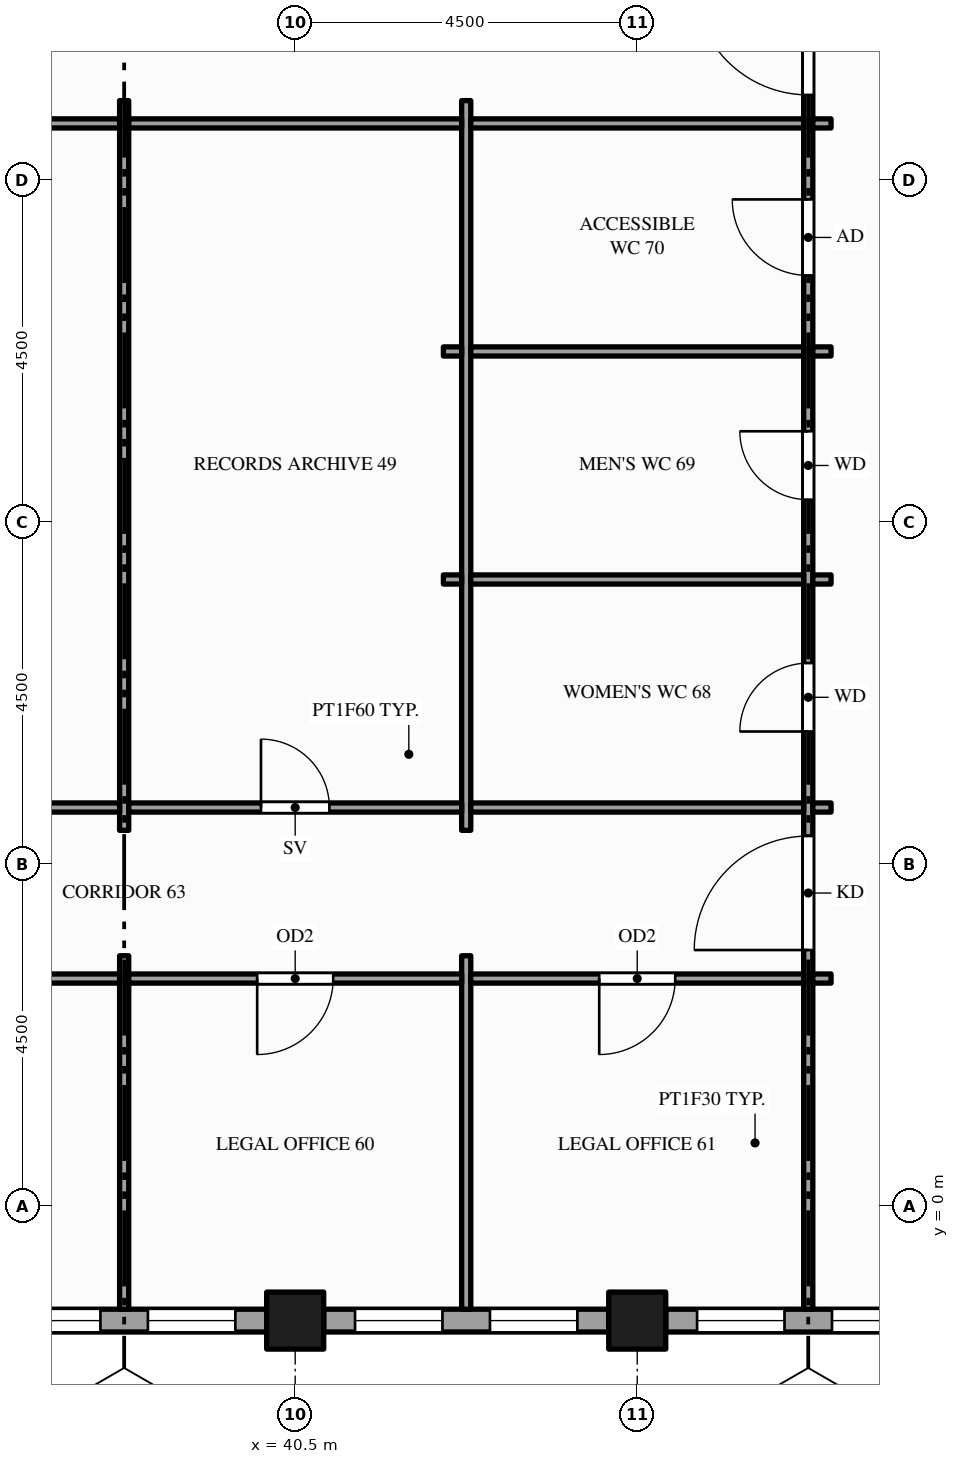
"""IFC4 building model, lengths in metres.
Left out: names, types, materials, properties, quantities, classifications, styles, units other than length and angle.
Written with IfcOpenShell. Run it as: python <this file> out.ifc"""

import sys

from ifc_helpers import new_model, si_unit, direction, frame, frame_2d, origin, origin_2d, place, context, subcontext, project, spatial, rectangle, hollow_rectangle, extrude, element, fill, save


model = new_model("IFC4")
c1 = context("Model", 3, precision=1e-05, world=origin(), true_north=direction((0.0, 1.0)))
c2 = subcontext(c1, "Body", "Model", "MODEL_VIEW")
j1 = project(units=[si_unit("LENGTHUNIT", "METRE"), si_unit("PLANEANGLEUNIT", "RADIAN")], contexts=[c1])
p1 = place(None, origin())
s1 = spatial("IfcSite", under=j1, at=p1, CompositionType="ELEMENT")
p2 = place(p1, origin())
s2 = spatial("IfcBuilding", under=s1, at=p2, CompositionType="ELEMENT")
p3 = place(p2, frame((0.0, 0.0, 227.0)))
s3 = spatial("IfcBuildingStorey", under=s2, at=p3, CompositionType="ELEMENT", Elevation=227.0)
for number, where, z_axis, x_axis in (
    (1, (40.5, -1.5, -0.15), (0.0, 0.0, 1.0), (1.0, 0.0, 0.0)),
    (2, (45.0, -1.5, -0.15), (0.0, 0.0, 1.0), (1.0, 0.0, 0.0)),
):
    element("IfcColumn", number, at=place(p3, frame(where, z_axis=z_axis, x_axis=x_axis)), inside=s3, PredefinedType="COLUMN", context=c2, shape_type="SweptSolid", body=[
        extrude(hollow_rectangle(XDim=0.75, YDim=0.75, WallThickness=0.036, at=origin_2d()), origin(), (0.0, 0.0, 1.0), 4.0),
    ])
p4 = place(p3, frame((36.375, -1.5, 0.0), z_axis=(0.0, 0.0, 1.0), x_axis=(1.0, 0.0, 0.0)))
e3 = element("IfcWall", 3, at=p4, inside=s3, PredefinedType="STANDARD", context=c2, shape_type="SweptSolid", body=[
    extrude(rectangle(XDim=3.75, YDim=0.3, at=frame_2d((1.875, 0.0))), origin(), (0.0, 0.0, 1.0), 2.87),
])
p5 = place(p4, frame((0.413, 0.0, 0.9)))
e4 = element("IfcOpeningElement", 4, at=p5, cuts=e3, PredefinedType="OPENING", context=c2, shape_type="SweptSolid", body=[
    extrude(rectangle(XDim=1.15, YDim=1.75, at=frame_2d((0.575, 0.875))), frame((0.0, 0.16, 0.0), z_axis=(0.0, -1.0, 0.0), x_axis=(1.0, 0.0, 0.0)), (0.0, 0.0, 1.0), 0.32),
])
p6 = place(p4, frame((2.188, 0.0, 0.9)))
e5 = element("IfcOpeningElement", 5, at=p6, cuts=e3, PredefinedType="OPENING", context=c2, shape_type="SweptSolid", body=[
    extrude(rectangle(XDim=1.15, YDim=1.75, at=frame_2d((0.575, 0.875))), frame((0.0, 0.16, 0.0), z_axis=(0.0, -1.0, 0.0), x_axis=(1.0, 0.0, 0.0)), (0.0, 0.0, 1.0), 0.32),
])
p7 = place(p3, frame((40.875, -1.5, 0.0), z_axis=(0.0, 0.0, 1.0), x_axis=(1.0, 0.0, 0.0)))
e6 = element("IfcWall", 6, at=p7, inside=s3, PredefinedType="STANDARD", context=c2, shape_type="SweptSolid", body=[
    extrude(rectangle(XDim=3.75, YDim=0.3, at=frame_2d((1.875, 0.0))), origin(), (0.0, 0.0, 1.0), 2.87),
])
p8 = place(p7, frame((0.413, 0.0, 0.9)))
e7 = element("IfcOpeningElement", 7, at=p8, cuts=e6, PredefinedType="OPENING", context=c2, shape_type="SweptSolid", body=[
    extrude(rectangle(XDim=1.15, YDim=1.75, at=frame_2d((0.575, 0.875))), frame((0.0, 0.16, 0.0), z_axis=(0.0, -1.0, 0.0), x_axis=(1.0, 0.0, 0.0)), (0.0, 0.0, 1.0), 0.32),
])
p9 = place(p7, frame((2.188, 0.0, 0.9)))
e8 = element("IfcOpeningElement", 8, at=p9, cuts=e6, PredefinedType="OPENING", context=c2, shape_type="SweptSolid", body=[
    extrude(rectangle(XDim=1.15, YDim=1.75, at=frame_2d((0.575, 0.875))), frame((0.0, 0.16, 0.0), z_axis=(0.0, -1.0, 0.0), x_axis=(1.0, 0.0, 0.0)), (0.0, 0.0, 1.0), 0.32),
])
p10 = place(p3, frame((45.375, -1.5, 0.0), z_axis=(0.0, 0.0, 1.0), x_axis=(1.0, 0.0, 0.0)))
e9 = element("IfcWall", 9, at=p10, inside=s3, PredefinedType="STANDARD", context=c2, shape_type="SweptSolid", body=[
    extrude(rectangle(XDim=3.75, YDim=0.3, at=frame_2d((1.875, 0.0))), origin(), (0.0, 0.0, 1.0), 2.87),
])
p11 = place(p10, frame((0.413, 0.0, 0.9)))
e10 = element("IfcOpeningElement", 10, at=p11, cuts=e9, PredefinedType="OPENING", context=c2, shape_type="SweptSolid", body=[
    extrude(rectangle(XDim=1.15, YDim=1.75, at=frame_2d((0.575, 0.875))), frame((0.0, 0.16, 0.0), z_axis=(0.0, -1.0, 0.0), x_axis=(1.0, 0.0, 0.0)), (0.0, 0.0, 1.0), 0.32),
])
p12 = place(p10, frame((2.188, 0.0, 0.9)))
e11 = element("IfcOpeningElement", 11, at=p12, cuts=e9, PredefinedType="OPENING", context=c2, shape_type="SweptSolid", body=[
    extrude(rectangle(XDim=1.15, YDim=1.75, at=frame_2d((0.575, 0.875))), frame((0.0, 0.16, 0.0), z_axis=(0.0, -1.0, 0.0), x_axis=(1.0, 0.0, 0.0)), (0.0, 0.0, 1.0), 0.32),
])
p13 = place(p3, frame((38.25, -1.35, 0.0), z_axis=(0.0, 0.0, 1.0), x_axis=(0.0, 1.0, 0.0)))
e12 = element("IfcWall", 12, at=p13, inside=s3, PredefinedType="PARTITIONING", context=c2, shape_type="SweptSolid", body=[
    extrude(rectangle(XDim=4.65, YDim=0.12, at=frame_2d((2.325, 0.0))), origin(), (0.0, 0.0, 1.0), 2.87),
])
p14 = place(p3, frame((38.25, 4.95, 0.0), z_axis=(0.0, 0.0, 1.0), x_axis=(0.0, 1.0, 0.0)))
e13 = element("IfcWall", 13, at=p14, inside=s3, PredefinedType="PARTITIONING", context=c2, shape_type="SweptSolid", body=[
    extrude(rectangle(XDim=9.6, YDim=0.12, at=frame_2d((4.8, 0.0))), origin(), (0.0, 0.0, 1.0), 2.87),
])
p15 = place(p3, frame((42.75, -1.35, 0.0), z_axis=(0.0, 0.0, 1.0), x_axis=(0.0, 1.0, 0.0)))
e14 = element("IfcWall", 14, at=p15, inside=s3, PredefinedType="PARTITIONING", context=c2, shape_type="SweptSolid", body=[
    extrude(rectangle(XDim=4.65, YDim=0.12, at=frame_2d((2.325, 0.0))), origin(), (0.0, 0.0, 1.0), 2.87),
])
p16 = place(p3, frame((42.75, 4.95, 0.0), z_axis=(0.0, 0.0, 1.0), x_axis=(0.0, 1.0, 0.0)))
e15 = element("IfcWall", 15, at=p16, inside=s3, PredefinedType="PARTITIONING", context=c2, shape_type="SweptSolid", body=[
    extrude(rectangle(XDim=9.6, YDim=0.12, at=frame_2d((4.8, 0.0))), origin(), (0.0, 0.0, 1.0), 2.87),
])
p17 = place(p3, frame((47.25, -1.35, 0.0), z_axis=(0.0, 0.0, 1.0), x_axis=(0.0, 1.0, 0.0)))
e16 = element("IfcWall", 16, at=p17, inside=s3, PredefinedType="PARTITIONING", context=c2, shape_type="SweptSolid", body=[
    extrude(rectangle(XDim=22.2, YDim=0.12, at=frame_2d((11.1, 0.0))), origin(), (0.0, 0.0, 1.0), 2.87),
])
p18 = place(p17, frame((4.725, 0.0, 0.0)))
e17 = element("IfcOpeningElement", 17, at=p18, cuts=e16, PredefinedType="OPENING", context=c2, shape_type="SweptSolid", body=[
    extrude(rectangle(XDim=1.5, YDim=2.1, at=frame_2d((0.75, 1.05))), frame((0.0, 0.07, 0.0), z_axis=(0.0, -1.0, 0.0), x_axis=(1.0, 0.0, 0.0)), (0.0, 0.0, 1.0), 0.14),
])
p19 = place(p17, frame((15.975, 0.0, 0.0)))
e18 = element("IfcOpeningElement", 18, at=p19, cuts=e16, PredefinedType="OPENING", context=c2, shape_type="SweptSolid", body=[
    extrude(rectangle(XDim=1.5, YDim=2.1, at=frame_2d((0.75, 1.05))), frame((0.0, 0.07, 0.0), z_axis=(0.0, -1.0, 0.0), x_axis=(1.0, 0.0, 0.0)), (0.0, 0.0, 1.0), 0.14),
])
p20 = place(p17, frame((7.6, 0.0, 0.0)))
e19 = element("IfcOpeningElement", 19, at=p20, cuts=e16, PredefinedType="OPENING", context=c2, shape_type="SweptSolid", body=[
    extrude(rectangle(XDim=0.9, YDim=2.1, at=frame_2d((0.45, 1.05))), frame((0.0, 0.07, 0.0), z_axis=(0.0, -1.0, 0.0), x_axis=(1.0, 0.0, 0.0)), (0.0, 0.0, 1.0), 0.14),
])
p21 = place(p17, frame((10.65, 0.0, 0.0)))
e20 = element("IfcOpeningElement", 20, at=p21, cuts=e16, PredefinedType="OPENING", context=c2, shape_type="SweptSolid", body=[
    extrude(rectangle(XDim=0.9, YDim=2.1, at=frame_2d((0.45, 1.05))), frame((0.0, 0.07, 0.0), z_axis=(0.0, -1.0, 0.0), x_axis=(1.0, 0.0, 0.0)), (0.0, 0.0, 1.0), 0.14),
])
p22 = place(p17, frame((13.6, 0.0, 0.0)))
e21 = element("IfcOpeningElement", 21, at=p22, cuts=e16, PredefinedType="OPENING", context=c2, shape_type="SweptSolid", body=[
    extrude(rectangle(XDim=1.0, YDim=2.1, at=frame_2d((0.5, 1.05))), frame((0.0, 0.07, 0.0), z_axis=(0.0, -1.0, 0.0), x_axis=(1.0, 0.0, 0.0)), (0.0, 0.0, 1.0), 0.14),
])
p23 = place(p3, frame((29.31, 3.0, 0.0), z_axis=(0.0, 0.0, 1.0), x_axis=(1.0, 0.0, 0.0)))
e22 = element("IfcWall", 22, at=p23, inside=s3, PredefinedType="PARTITIONING", context=c2, shape_type="SweptSolid", body=[
    extrude(rectangle(XDim=8.88, YDim=0.12, at=frame_2d((4.44, 0.0))), origin(), (0.0, 0.0, 1.0), 2.87),
])
p24 = place(p23, frame((3.54, 0.0, 0.0)))
e23 = element("IfcOpeningElement", 23, at=p24, cuts=e22, PredefinedType="OPENING", context=c2, shape_type="SweptSolid", body=[
    extrude(rectangle(XDim=1.8, YDim=2.1, at=frame_2d((0.9, 1.05))), frame((0.0, 0.07, 0.0), z_axis=(0.0, -1.0, 0.0), x_axis=(1.0, 0.0, 0.0)), (0.0, 0.0, 1.0), 0.14),
])
p25 = place(p3, frame((38.31, 3.0, 0.0), z_axis=(0.0, 0.0, 1.0), x_axis=(1.0, 0.0, 0.0)))
e24 = element("IfcWall", 24, at=p25, inside=s3, PredefinedType="PARTITIONING", context=c2, shape_type="SweptSolid", body=[
    extrude(rectangle(XDim=4.38, YDim=0.12, at=frame_2d((2.19, 0.0))), origin(), (0.0, 0.0, 1.0), 2.87),
])
p26 = place(p25, frame((1.69, 0.0, 0.0)))
e25 = element("IfcOpeningElement", 25, at=p26, cuts=e24, PredefinedType="OPENING", context=c2, shape_type="SweptSolid", body=[
    extrude(rectangle(XDim=1.0, YDim=2.1, at=frame_2d((0.5, 1.05))), frame((0.0, 0.07, 0.0), z_axis=(0.0, -1.0, 0.0), x_axis=(1.0, 0.0, 0.0)), (0.0, 0.0, 1.0), 0.14),
])
p27 = place(p3, frame((42.81, 3.0, 0.0), z_axis=(0.0, 0.0, 1.0), x_axis=(1.0, 0.0, 0.0)))
e26 = element("IfcWall", 26, at=p27, inside=s3, PredefinedType="PARTITIONING", context=c2, shape_type="SweptSolid", body=[
    extrude(rectangle(XDim=4.38, YDim=0.12, at=frame_2d((2.19, 0.0))), origin(), (0.0, 0.0, 1.0), 2.87),
])
p28 = place(p27, frame((1.69, 0.0, 0.0)))
e27 = element("IfcOpeningElement", 27, at=p28, cuts=e26, PredefinedType="OPENING", context=c2, shape_type="SweptSolid", body=[
    extrude(rectangle(XDim=1.0, YDim=2.1, at=frame_2d((0.5, 1.05))), frame((0.0, 0.07, 0.0), z_axis=(0.0, -1.0, 0.0), x_axis=(1.0, 0.0, 0.0)), (0.0, 0.0, 1.0), 0.14),
])
p29 = place(p3, frame((47.31, 3.0, 0.0), z_axis=(0.0, 0.0, 1.0), x_axis=(1.0, 0.0, 0.0)))
e28 = element("IfcWall", 28, at=p29, inside=s3, PredefinedType="PARTITIONING", context=c2, shape_type="SweptSolid", body=[
    extrude(rectangle(XDim=0.24, YDim=0.12, at=frame_2d((0.12, 0.0))), origin(), (0.0, 0.0, 1.0), 2.87),
])
p30 = place(p3, frame((33.81, 5.25, 0.0), z_axis=(0.0, 0.0, 1.0), x_axis=(1.0, 0.0, 0.0)))
e29 = element("IfcWall", 29, at=p30, inside=s3, PredefinedType="PARTITIONING", context=c2, shape_type="SweptSolid", body=[
    extrude(rectangle(XDim=4.38, YDim=0.12, at=frame_2d((2.19, 0.0))), origin(), (0.0, 0.0, 1.0), 2.87),
])
p31 = place(p3, frame((38.31, 5.25, 0.0), z_axis=(0.0, 0.0, 1.0), x_axis=(1.0, 0.0, 0.0)))
e30 = element("IfcWall", 30, at=p31, inside=s3, PredefinedType="PARTITIONING", context=c2, shape_type="SweptSolid", body=[
    extrude(rectangle(XDim=4.38, YDim=0.12, at=frame_2d((2.19, 0.0))), origin(), (0.0, 0.0, 1.0), 2.87),
])
p32 = place(p31, frame((1.74, 0.0, 0.0)))
e31 = element("IfcOpeningElement", 31, at=p32, cuts=e30, PredefinedType="OPENING", context=c2, shape_type="SweptSolid", body=[
    extrude(rectangle(XDim=0.9, YDim=2.1, at=frame_2d((0.45, 1.05))), frame((0.0, 0.07, 0.0), z_axis=(0.0, -1.0, 0.0), x_axis=(1.0, 0.0, 0.0)), (0.0, 0.0, 1.0), 0.14),
])
p33 = place(p3, frame((42.81, 5.25, 0.0), z_axis=(0.0, 0.0, 1.0), x_axis=(1.0, 0.0, 0.0)))
e32 = element("IfcWall", 32, at=p33, inside=s3, PredefinedType="PARTITIONING", context=c2, shape_type="SweptSolid", body=[
    extrude(rectangle(XDim=4.38, YDim=0.12, at=frame_2d((2.19, 0.0))), origin(), (0.0, 0.0, 1.0), 2.87),
])
for number, where, z_axis, x_axis in (
    (33, (47.31, 5.25, 0.0), (0.0, 0.0, 1.0), (1.0, 0.0, 0.0)),
    (34, (42.45, 8.25, 0.0), (0.0, 0.0, 1.0), (1.0, 0.0, 0.0)),
):
    element("IfcWall", number, at=place(p3, frame(where, z_axis=z_axis, x_axis=x_axis)), inside=s3, PredefinedType="PARTITIONING", context=c2, shape_type="SweptSolid", body=[
        extrude(rectangle(XDim=0.24, YDim=0.12, at=frame_2d((0.12, 0.0))), origin(), (0.0, 0.0, 1.0), 2.87),
    ])
p34 = place(p3, frame((42.81, 8.25, 0.0), z_axis=(0.0, 0.0, 1.0), x_axis=(1.0, 0.0, 0.0)))
e35 = element("IfcWall", 35, at=p34, inside=s3, PredefinedType="PARTITIONING", context=c2, shape_type="SweptSolid", body=[
    extrude(rectangle(XDim=4.38, YDim=0.12, at=frame_2d((2.19, 0.0))), origin(), (0.0, 0.0, 1.0), 2.87),
])
for number, where, z_axis, x_axis in (
    (36, (47.31, 8.25, 0.0), (0.0, 0.0, 1.0), (1.0, 0.0, 0.0)),
    (37, (42.45, 11.25, 0.0), (0.0, 0.0, 1.0), (1.0, 0.0, 0.0)),
):
    element("IfcWall", number, at=place(p3, frame(where, z_axis=z_axis, x_axis=x_axis)), inside=s3, PredefinedType="PARTITIONING", context=c2, shape_type="SweptSolid", body=[
        extrude(rectangle(XDim=0.24, YDim=0.12, at=frame_2d((0.12, 0.0))), origin(), (0.0, 0.0, 1.0), 2.87),
    ])
p35 = place(p3, frame((42.81, 11.25, 0.0), z_axis=(0.0, 0.0, 1.0), x_axis=(1.0, 0.0, 0.0)))
e38 = element("IfcWall", 38, at=p35, inside=s3, PredefinedType="PARTITIONING", context=c2, shape_type="SweptSolid", body=[
    extrude(rectangle(XDim=4.38, YDim=0.12, at=frame_2d((2.19, 0.0))), origin(), (0.0, 0.0, 1.0), 2.87),
])
p36 = place(p3, frame((47.31, 11.25, 0.0), z_axis=(0.0, 0.0, 1.0), x_axis=(1.0, 0.0, 0.0)))
e39 = element("IfcWall", 39, at=p36, inside=s3, PredefinedType="PARTITIONING", context=c2, shape_type="SweptSolid", body=[
    extrude(rectangle(XDim=0.24, YDim=0.12, at=frame_2d((0.12, 0.0))), origin(), (0.0, 0.0, 1.0), 2.87),
])
p37 = place(p3, frame((33.81, 14.25, 0.0), z_axis=(0.0, 0.0, 1.0), x_axis=(1.0, 0.0, 0.0)))
e40 = element("IfcWall", 40, at=p37, inside=s3, PredefinedType="PARTITIONING", context=c2, shape_type="SweptSolid", body=[
    extrude(rectangle(XDim=4.38, YDim=0.12, at=frame_2d((2.19, 0.0))), origin(), (0.0, 0.0, 1.0), 2.87),
])
p38 = place(p37, frame((1.59, 0.0, 0.0)))
e41 = element("IfcOpeningElement", 41, at=p38, cuts=e40, PredefinedType="OPENING", context=c2, shape_type="SweptSolid", body=[
    extrude(rectangle(XDim=1.2, YDim=2.1, at=frame_2d((0.6, 1.05))), frame((0.0, 0.07, 0.0), z_axis=(0.0, -1.0, 0.0), x_axis=(1.0, 0.0, 0.0)), (0.0, 0.0, 1.0), 0.14),
])
for number, where, z_axis, x_axis in (
    (42, (38.31, 14.25, 0.0), (0.0, 0.0, 1.0), (1.0, 0.0, 0.0)),
    (43, (42.81, 14.25, 0.0), (0.0, 0.0, 1.0), (1.0, 0.0, 0.0)),
):
    element("IfcWall", number, at=place(p3, frame(where, z_axis=z_axis, x_axis=x_axis)), inside=s3, PredefinedType="PARTITIONING", context=c2, shape_type="SweptSolid", body=[
        extrude(rectangle(XDim=4.38, YDim=0.12, at=frame_2d((2.19, 0.0))), origin(), (0.0, 0.0, 1.0), 2.87),
    ])
p39 = place(p3, frame((47.31, 14.25, 0.0), z_axis=(0.0, 0.0, 1.0), x_axis=(1.0, 0.0, 0.0)))
e44 = element("IfcWall", 44, at=p39, inside=s3, PredefinedType="PARTITIONING", context=c2, shape_type="SweptSolid", body=[
    extrude(rectangle(XDim=0.24, YDim=0.12, at=frame_2d((0.12, 0.0))), origin(), (0.0, 0.0, 1.0), 2.87),
])
p40 = place(p5, origin())
e45 = element("IfcWindow", 45, at=p40, inside=s3, PartitioningType="SINGLE_PANEL", PredefinedType="WINDOW", context=c2, shape_type="SweptSolid", body=[
    extrude(rectangle(XDim=1.15, YDim=1.75, at=frame_2d((0.575, 0.875))), frame((0.0, 0.03, 0.0), z_axis=(0.0, -1.0, 0.0), x_axis=(1.0, 0.0, 0.0)), (0.0, 0.0, 1.0), 0.06),
])
fill(e4, e45)
p41 = place(p6, origin())
e46 = element("IfcWindow", 46, at=p41, inside=s3, PartitioningType="SINGLE_PANEL", PredefinedType="WINDOW", context=c2, shape_type="SweptSolid", body=[
    extrude(rectangle(XDim=1.15, YDim=1.75, at=frame_2d((0.575, 0.875))), frame((0.0, 0.03, 0.0), z_axis=(0.0, -1.0, 0.0), x_axis=(1.0, 0.0, 0.0)), (0.0, 0.0, 1.0), 0.06),
])
fill(e5, e46)
p42 = place(p8, origin())
e47 = element("IfcWindow", 47, at=p42, inside=s3, PartitioningType="SINGLE_PANEL", PredefinedType="WINDOW", context=c2, shape_type="SweptSolid", body=[
    extrude(rectangle(XDim=1.15, YDim=1.75, at=frame_2d((0.575, 0.875))), frame((0.0, 0.03, 0.0), z_axis=(0.0, -1.0, 0.0), x_axis=(1.0, 0.0, 0.0)), (0.0, 0.0, 1.0), 0.06),
])
fill(e7, e47)
p43 = place(p9, origin())
e48 = element("IfcWindow", 48, at=p43, inside=s3, PartitioningType="SINGLE_PANEL", PredefinedType="WINDOW", context=c2, shape_type="SweptSolid", body=[
    extrude(rectangle(XDim=1.15, YDim=1.75, at=frame_2d((0.575, 0.875))), frame((0.0, 0.03, 0.0), z_axis=(0.0, -1.0, 0.0), x_axis=(1.0, 0.0, 0.0)), (0.0, 0.0, 1.0), 0.06),
])
fill(e8, e48)
p44 = place(p11, origin())
e49 = element("IfcWindow", 49, at=p44, inside=s3, PartitioningType="SINGLE_PANEL", PredefinedType="WINDOW", context=c2, shape_type="SweptSolid", body=[
    extrude(rectangle(XDim=1.15, YDim=1.75, at=frame_2d((0.575, 0.875))), frame((0.0, 0.03, 0.0), z_axis=(0.0, -1.0, 0.0), x_axis=(1.0, 0.0, 0.0)), (0.0, 0.0, 1.0), 0.06),
])
fill(e10, e49)
p45 = place(p12, origin())
e50 = element("IfcWindow", 50, at=p45, inside=s3, PartitioningType="SINGLE_PANEL", PredefinedType="WINDOW", context=c2, shape_type="SweptSolid", body=[
    extrude(rectangle(XDim=1.15, YDim=1.75, at=frame_2d((0.575, 0.875))), frame((0.0, 0.03, 0.0), z_axis=(0.0, -1.0, 0.0), x_axis=(1.0, 0.0, 0.0)), (0.0, 0.0, 1.0), 0.06),
])
fill(e11, e50)
p46 = place(p18, origin())
e51 = element("IfcDoor", 51, at=p46, inside=s3, OperationType="SINGLE_SWING_LEFT", PredefinedType="DOOR", context=c2, shape_type="SweptSolid", body=[
    extrude(rectangle(XDim=1.5, YDim=2.1, at=frame_2d((0.75, 1.05))), frame((0.0, 0.025, 0.0), z_axis=(0.0, -1.0, 0.0), x_axis=(1.0, 0.0, 0.0)), (0.0, 0.0, 1.0), 0.05),
])
fill(e17, e51)
p47 = place(p19, origin())
e52 = element("IfcDoor", 52, at=p47, inside=s3, OperationType="SINGLE_SWING_RIGHT", PredefinedType="DOOR", context=c2, shape_type="SweptSolid", body=[
    extrude(rectangle(XDim=1.5, YDim=2.1, at=frame_2d((0.75, 1.05))), frame((0.0, 0.025, 0.0), z_axis=(0.0, -1.0, 0.0), x_axis=(1.0, 0.0, 0.0)), (0.0, 0.0, 1.0), 0.05),
])
fill(e18, e52)
p48 = place(p32, origin())
e53 = element("IfcDoor", 53, at=p48, inside=s3, OperationType="SINGLE_SWING_LEFT", PredefinedType="DOOR", context=c2, shape_type="SweptSolid", body=[
    extrude(rectangle(XDim=0.9, YDim=2.1, at=frame_2d((0.45, 1.05))), frame((0.0, 0.025, 0.0), z_axis=(0.0, -1.0, 0.0), x_axis=(1.0, 0.0, 0.0)), (0.0, 0.0, 1.0), 0.05),
])
fill(e31, e53)
p49 = place(p20, origin())
e54 = element("IfcDoor", 54, at=p49, inside=s3, OperationType="SINGLE_SWING_LEFT", PredefinedType="DOOR", context=c2, shape_type="SweptSolid", body=[
    extrude(rectangle(XDim=0.9, YDim=2.1, at=frame_2d((0.45, 1.05))), frame((0.0, 0.025, 0.0), z_axis=(0.0, -1.0, 0.0), x_axis=(1.0, 0.0, 0.0)), (0.0, 0.0, 1.0), 0.05),
])
fill(e19, e54)
p50 = place(p21, origin())
e55 = element("IfcDoor", 55, at=p50, inside=s3, OperationType="SINGLE_SWING_RIGHT", PredefinedType="DOOR", context=c2, shape_type="SweptSolid", body=[
    extrude(rectangle(XDim=0.9, YDim=2.1, at=frame_2d((0.45, 1.05))), frame((0.0, 0.025, 0.0), z_axis=(0.0, -1.0, 0.0), x_axis=(1.0, 0.0, 0.0)), (0.0, 0.0, 1.0), 0.05),
])
fill(e20, e55)
p51 = place(p22, origin())
e56 = element("IfcDoor", 56, at=p51, inside=s3, OperationType="SINGLE_SWING_RIGHT", PredefinedType="DOOR", context=c2, shape_type="SweptSolid", body=[
    extrude(rectangle(XDim=1.0, YDim=2.1, at=frame_2d((0.5, 1.05))), frame((0.0, 0.025, 0.0), z_axis=(0.0, -1.0, 0.0), x_axis=(1.0, 0.0, 0.0)), (0.0, 0.0, 1.0), 0.05),
])
fill(e21, e56)
p52 = place(p26, origin())
e57 = element("IfcDoor", 57, at=p52, inside=s3, OperationType="SINGLE_SWING_LEFT", PredefinedType="DOOR", context=c2, shape_type="SweptSolid", body=[
    extrude(rectangle(XDim=1.0, YDim=2.1, at=frame_2d((0.5, 1.05))), frame((0.0, 0.025, 0.0), z_axis=(0.0, -1.0, 0.0), x_axis=(1.0, 0.0, 0.0)), (0.0, 0.0, 1.0), 0.05),
])
fill(e25, e57)
p53 = place(p28, origin())
e58 = element("IfcDoor", 58, at=p53, inside=s3, OperationType="SINGLE_SWING_LEFT", PredefinedType="DOOR", context=c2, shape_type="SweptSolid", body=[
    extrude(rectangle(XDim=1.0, YDim=2.1, at=frame_2d((0.5, 1.05))), frame((0.0, 0.025, 0.0), z_axis=(0.0, -1.0, 0.0), x_axis=(1.0, 0.0, 0.0)), (0.0, 0.0, 1.0), 0.05),
])
fill(e27, e58)
save(model, sys.argv[1])
